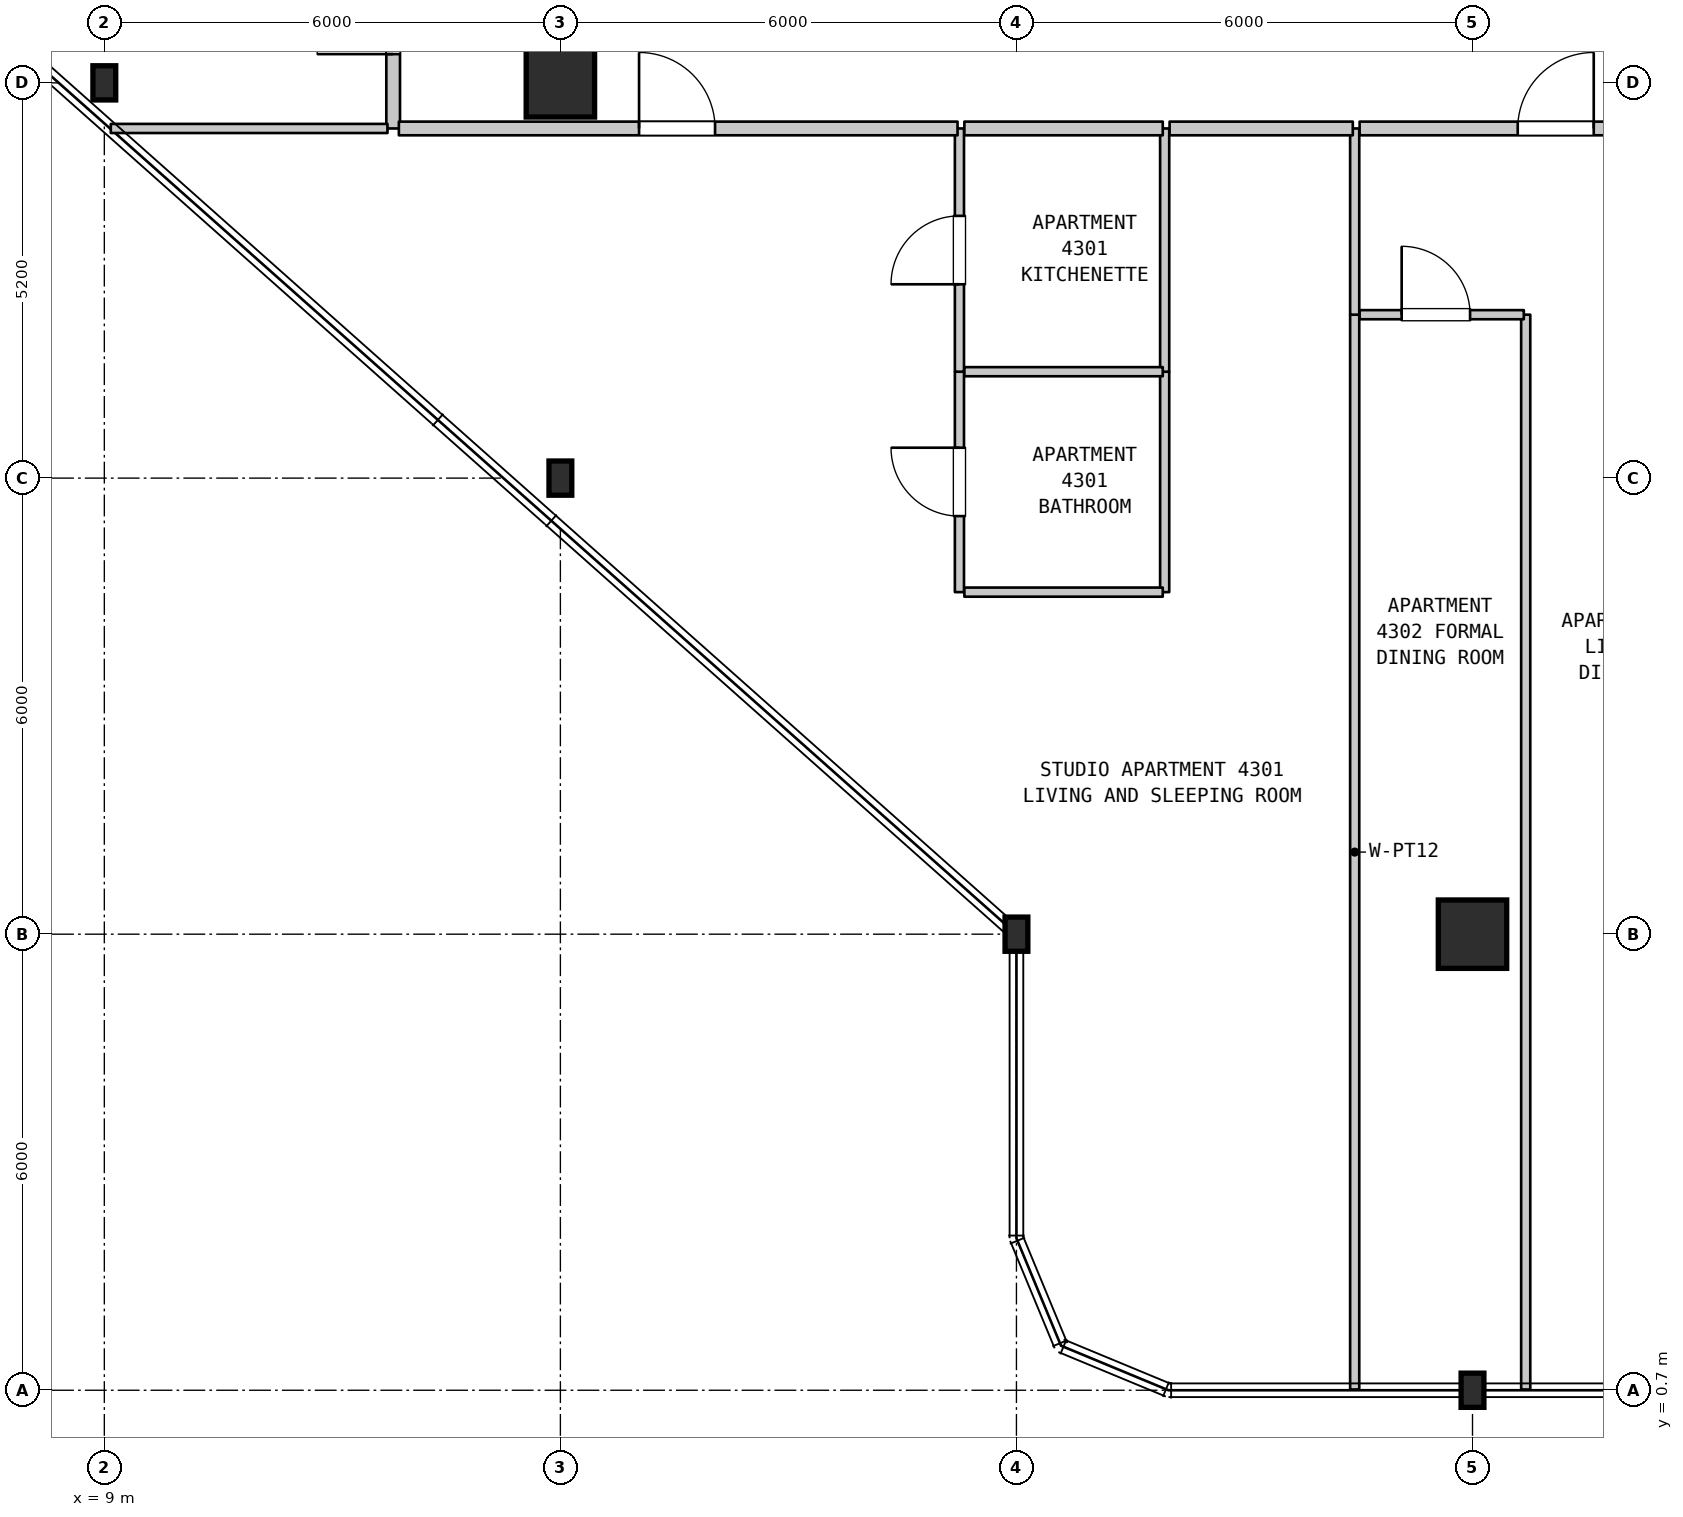
"""IFC4 building model, lengths in metres.
Left out: names, types, materials, properties, quantities, classifications, styles, units other than length and angle.
Written with IfcOpenShell. Run it as: python <this file> out.ifc"""

import sys

from ifc_helpers import new_model, si_unit, direction, frame, frame_2d, origin, origin_2d, place, context, subcontext, project, spatial, rectangle, i_section, extrude, element, fill, save


model = new_model("IFC4")
c1 = context("Model", 3, precision=1e-05, world=origin(), true_north=direction((0.0, 1.0)))
c2 = subcontext(c1, "Body", "Model", "MODEL_VIEW")
j1 = project(units=[si_unit("LENGTHUNIT", "METRE"), si_unit("PLANEANGLEUNIT", "RADIAN")], contexts=[c1])
p1 = place(None, origin())
s1 = spatial("IfcSite", under=j1, at=p1, CompositionType="ELEMENT")
p2 = place(p1, origin())
s2 = spatial("IfcBuilding", under=s1, at=p2, CompositionType="ELEMENT")
p3 = place(p2, frame((0.0, 0.0, 176.5)))
s3 = spatial("IfcBuildingStorey", under=s2, at=p3, CompositionType="ELEMENT", Elevation=176.5)
for number, where, z_axis, x_axis in (
    (1, (9.0, 17.9, 0.0), (0.0, 0.0, 1.0), (1.0, 0.0, 0.0)),
    (2, (15.0, 12.7, 0.0), (0.0, 0.0, 1.0), (1.0, 0.0, 0.0)),
):
    element("IfcColumn", number, at=place(p3, frame(where, z_axis=z_axis, x_axis=x_axis)), inside=s3, PredefinedType="COLUMN", context=c2, shape_type="SweptSolid", body=[
        extrude(i_section(OverallWidth=0.3, OverallDepth=0.45, WebThickness=0.014, FlangeThickness=0.026, FilletRadius=0.027, at=origin_2d()), origin(), (0.0, 0.0, 1.0), 3.7),
    ])
p4 = place(p3, frame((15.0, 17.9, 0.0), z_axis=(0.0, 0.0, 1.0), x_axis=(1.0, 0.0, 0.0)))
e3 = element("IfcColumn", 3, at=p4, inside=s3, PredefinedType="COLUMN", context=c2, shape_type="SweptSolid", body=[
    extrude(rectangle(XDim=0.9, YDim=0.9, at=origin_2d()), origin(), (0.0, 0.0, 1.0), 3.7),
])
for number, where, z_axis, x_axis in (
    (4, (21.0, 6.7, 0.0), (0.0, 0.0, 1.0), (1.0, 0.0, 0.0)),
    (5, (27.0, 0.7, 0.0), (0.0, 0.0, 1.0), (1.0, 0.0, 0.0)),
):
    element("IfcColumn", number, at=place(p3, frame(where, z_axis=z_axis, x_axis=x_axis)), inside=s3, PredefinedType="COLUMN", context=c2, shape_type="SweptSolid", body=[
        extrude(i_section(OverallWidth=0.3, OverallDepth=0.45, WebThickness=0.014, FlangeThickness=0.026, FilletRadius=0.027, at=origin_2d()), origin(), (0.0, 0.0, 1.0), 3.7),
    ])
p5 = place(p3, frame((27.0, 6.7, 0.0), z_axis=(0.0, 0.0, 1.0), x_axis=(1.0, 0.0, 0.0)))
e6 = element("IfcColumn", 6, at=p5, inside=s3, PredefinedType="COLUMN", context=c2, shape_type="SweptSolid", body=[
    extrude(rectangle(XDim=0.9, YDim=0.9, at=origin_2d()), origin(), (0.0, 0.0, 1.0), 3.7),
])
p6 = place(p3, frame((12.8, 17.3, 0.0), z_axis=(0.0, 0.0, 1.0), x_axis=(0.0, 1.0, 0.0)))
e7 = element("IfcWall", 7, at=p6, inside=s3, PredefinedType="STANDARD", context=c2, shape_type="SweptSolid", body=[
    extrude(rectangle(XDim=3.1, YDim=0.18, at=frame_2d((1.55, 0.0))), origin(), (0.0, 0.0, 1.0), 3.39),
])
p7 = place(p6, frame((0.978, 0.0, 0.0)))
e8 = element("IfcOpeningElement", 8, at=p7, cuts=e7, PredefinedType="OPENING", context=c2, shape_type="SweptSolid", body=[
    extrude(rectangle(XDim=1.0, YDim=2.15, at=frame_2d((0.5, 1.075))), frame((0.0, 0.1, 0.0), z_axis=(0.0, -1.0, 0.0), x_axis=(1.0, 0.0, 0.0)), (0.0, 0.0, 1.0), 0.2),
])
p8 = place(p3, frame((20.25, 11.2, 0.0), z_axis=(0.0, 0.0, 1.0), x_axis=(0.0, 1.0, 0.0)))
e9 = element("IfcWall", 9, at=p8, inside=s3, PredefinedType="PARTITIONING", context=c2, shape_type="SweptSolid", body=[
    extrude(rectangle(XDim=2.9, YDim=0.12, at=frame_2d((1.45, 0.0))), origin(), (0.0, 0.0, 1.0), 3.39),
])
p9 = place(p8, frame((1.0, 0.0, 0.0)))
e10 = element("IfcOpeningElement", 10, at=p9, cuts=e9, PredefinedType="OPENING", context=c2, shape_type="SweptSolid", body=[
    extrude(rectangle(XDim=0.9, YDim=2.1, at=frame_2d((0.45, 1.05))), frame((0.0, 0.07, 0.0), z_axis=(0.0, -1.0, 0.0), x_axis=(1.0, 0.0, 0.0)), (0.0, 0.0, 1.0), 0.14),
])
p10 = place(p3, frame((20.25, 14.1, 0.0), z_axis=(0.0, 0.0, 1.0), x_axis=(0.0, 1.0, 0.0)))
e11 = element("IfcWall", 11, at=p10, inside=s3, PredefinedType="PARTITIONING", context=c2, shape_type="SweptSolid", body=[
    extrude(rectangle(XDim=3.2, YDim=0.12, at=frame_2d((1.6, 0.0))), origin(), (0.0, 0.0, 1.0), 3.39),
])
p11 = place(p10, frame((1.15, 0.0, 0.0)))
e12 = element("IfcOpeningElement", 12, at=p11, cuts=e11, PredefinedType="OPENING", context=c2, shape_type="SweptSolid", body=[
    extrude(rectangle(XDim=0.9, YDim=2.15, at=frame_2d((0.45, 1.075))), frame((0.0, 0.07, 0.0), z_axis=(0.0, -1.0, 0.0), x_axis=(1.0, 0.0, 0.0)), (0.0, 0.0, 1.0), 0.14),
])
p12 = place(p3, frame((22.95, 11.2, 0.0), z_axis=(0.0, 0.0, 1.0), x_axis=(0.0, 1.0, 0.0)))
e13 = element("IfcWall", 13, at=p12, inside=s3, PredefinedType="PARTITIONING", context=c2, shape_type="SweptSolid", body=[
    extrude(rectangle(XDim=2.9, YDim=0.12, at=frame_2d((1.45, 0.0))), origin(), (0.0, 0.0, 1.0), 3.39),
])
p13 = place(p3, frame((22.95, 14.1, 0.0), z_axis=(0.0, 0.0, 1.0), x_axis=(0.0, 1.0, 0.0)))
e14 = element("IfcWall", 14, at=p13, inside=s3, PredefinedType="PARTITIONING", context=c2, shape_type="SweptSolid", body=[
    extrude(rectangle(XDim=3.2, YDim=0.12, at=frame_2d((1.6, 0.0))), origin(), (0.0, 0.0, 1.0), 3.39),
])
p14 = place(p3, frame((25.45, 0.71, 0.0), z_axis=(0.0, 0.0, 1.0), x_axis=(0.0, 1.0, 0.0)))
e15 = element("IfcWall", 15, at=p14, inside=s3, PredefinedType="PARTITIONING", context=c2, shape_type="SweptSolid", body=[
    extrude(rectangle(XDim=14.14, YDim=0.12, at=frame_2d((7.07, 0.0))), origin(), (0.0, 0.0, 1.0), 3.39),
])
p15 = place(p3, frame((25.45, 14.85, 0.0), z_axis=(0.0, 0.0, 1.0), x_axis=(0.0, 1.0, 0.0)))
e16 = element("IfcWall", 16, at=p15, inside=s3, PredefinedType="PARTITIONING", context=c2, shape_type="SweptSolid", body=[
    extrude(rectangle(XDim=2.45, YDim=0.12, at=frame_2d((1.225, 0.0))), origin(), (0.0, 0.0, 1.0), 3.39),
])
p16 = place(p3, frame((27.7, 0.71, 0.0), z_axis=(0.0, 0.0, 1.0), x_axis=(0.0, 1.0, 0.0)))
e17 = element("IfcWall", 17, at=p16, inside=s3, PredefinedType="PARTITIONING", context=c2, shape_type="SweptSolid", body=[
    extrude(rectangle(XDim=14.14, YDim=0.12, at=frame_2d((7.07, 0.0))), origin(), (0.0, 0.0, 1.0), 3.39),
])
for number, where, z_axis, x_axis in (
    (18, (20.315, 11.2, 0.0), (0.0, 0.0, 1.0), (1.0, 0.0, 0.0)),
    (19, (20.315, 14.1, 0.0), (0.0, 0.0, 1.0), (1.0, 0.0, 0.0)),
):
    element("IfcWall", number, at=place(p3, frame(where, z_axis=z_axis, x_axis=x_axis)), inside=s3, PredefinedType="PARTITIONING", context=c2, shape_type="SweptSolid", body=[
        extrude(rectangle(XDim=2.61, YDim=0.12, at=frame_2d((1.305, 0.0))), origin(), (0.0, 0.0, 1.0), 3.39),
    ])
p17 = place(p3, frame((25.515, 14.85, 0.0), z_axis=(0.0, 0.0, 1.0), x_axis=(1.0, 0.0, 0.0)))
e20 = element("IfcWall", 20, at=p17, inside=s3, PredefinedType="PARTITIONING", context=c2, shape_type="SweptSolid", body=[
    extrude(rectangle(XDim=2.16, YDim=0.12, at=frame_2d((1.08, 0.0))), origin(), (0.0, 0.0, 1.0), 3.39),
])
p18 = place(p17, frame((0.553, 0.0, 0.0)))
e21 = element("IfcOpeningElement", 21, at=p18, cuts=e20, PredefinedType="OPENING", context=c2, shape_type="SweptSolid", body=[
    extrude(rectangle(XDim=0.9, YDim=2.15, at=frame_2d((0.45, 1.075))), frame((0.0, 0.07, 0.0), z_axis=(0.0, -1.0, 0.0), x_axis=(1.0, 0.0, 0.0)), (0.0, 0.0, 1.0), 0.14),
])
p19 = place(p3, frame((9.085, 17.3, 0.0), z_axis=(0.0, 0.0, 1.0), x_axis=(1.0, 0.0, 0.0)))
e22 = element("IfcWall", 22, at=p19, inside=s3, PredefinedType="PARTITIONING", context=c2, shape_type="SweptSolid", body=[
    extrude(rectangle(XDim=3.64, YDim=0.12, at=frame_2d((1.82, 0.0))), origin(), (0.0, 0.0, 1.0), 3.39),
])
p20 = place(p3, frame((12.875, 17.3, 0.0), z_axis=(0.0, 0.0, 1.0), x_axis=(1.0, 0.0, 0.0)))
e23 = element("IfcWall", 23, at=p20, inside=s3, PredefinedType="STANDARD", context=c2, shape_type="SweptSolid", body=[
    extrude(rectangle(XDim=7.35, YDim=0.18, at=frame_2d((3.675, 0.0))), origin(), (0.0, 0.0, 1.0), 3.39),
])
p21 = place(p20, frame((3.16, 0.0, 0.0)))
e24 = element("IfcOpeningElement", 24, at=p21, cuts=e23, PredefinedType="OPENING", context=c2, shape_type="SweptSolid", body=[
    extrude(rectangle(XDim=1.0, YDim=2.15, at=frame_2d((0.5, 1.075))), frame((0.0, 0.1, 0.0), z_axis=(0.0, -1.0, 0.0), x_axis=(1.0, 0.0, 0.0)), (0.0, 0.0, 1.0), 0.2),
])
p22 = place(p3, frame((20.315, 17.3, 0.0), z_axis=(0.0, 0.0, 1.0), x_axis=(1.0, 0.0, 0.0)))
e25 = element("IfcWall", 25, at=p22, inside=s3, PredefinedType="STANDARD", context=c2, shape_type="SweptSolid", body=[
    extrude(rectangle(XDim=2.61, YDim=0.18, at=frame_2d((1.305, 0.0))), origin(), (0.0, 0.0, 1.0), 3.39),
])
p23 = place(p3, frame((23.015, 17.3, 0.0), z_axis=(0.0, 0.0, 1.0), x_axis=(1.0, 0.0, 0.0)))
e26 = element("IfcWall", 26, at=p23, inside=s3, PredefinedType="STANDARD", context=c2, shape_type="SweptSolid", body=[
    extrude(rectangle(XDim=2.41, YDim=0.18, at=frame_2d((1.205, 0.0))), origin(), (0.0, 0.0, 1.0), 3.39),
])
p24 = place(p3, frame((25.515, 17.3, 0.0), z_axis=(0.0, 0.0, 1.0), x_axis=(1.0, 0.0, 0.0)))
e27 = element("IfcWall", 27, at=p24, inside=s3, PredefinedType="STANDARD", context=c2, shape_type="SweptSolid", body=[
    extrude(rectangle(XDim=5.095, YDim=0.18, at=frame_2d((2.548, 0.0))), origin(), (0.0, 0.0, 1.0), 3.39),
])
p25 = place(p24, frame((2.08, 0.0, 0.0)))
e28 = element("IfcOpeningElement", 28, at=p25, cuts=e27, PredefinedType="OPENING", context=c2, shape_type="SweptSolid", body=[
    extrude(rectangle(XDim=1.0, YDim=2.15, at=frame_2d((0.5, 1.075))), frame((0.0, 0.1, 0.0), z_axis=(0.0, -1.0, 0.0), x_axis=(1.0, 0.0, 0.0)), (0.0, 0.0, 1.0), 0.2),
])
p26 = place(p7, origin())
e29 = element("IfcDoor", 29, at=p26, inside=s3, OperationType="SINGLE_SWING_LEFT", PredefinedType="DOOR", context=c2, shape_type="SweptSolid", body=[
    extrude(rectangle(XDim=1.0, YDim=2.15, at=frame_2d((0.5, 1.075))), frame((0.0, 0.025, 0.0), z_axis=(0.0, -1.0, 0.0), x_axis=(1.0, 0.0, 0.0)), (0.0, 0.0, 1.0), 0.05),
])
fill(e8, e29)
p27 = place(p9, origin())
e30 = element("IfcDoor", 30, at=p27, inside=s3, OperationType="SINGLE_SWING_RIGHT", PredefinedType="DOOR", context=c2, shape_type="SweptSolid", body=[
    extrude(rectangle(XDim=0.9, YDim=2.1, at=frame_2d((0.45, 1.05))), frame((0.0, 0.025, 0.0), z_axis=(0.0, -1.0, 0.0), x_axis=(1.0, 0.0, 0.0)), (0.0, 0.0, 1.0), 0.05),
])
fill(e10, e30)
p28 = place(p11, origin())
e31 = element("IfcDoor", 31, at=p28, inside=s3, OperationType="SINGLE_SWING_LEFT", PredefinedType="DOOR", context=c2, shape_type="SweptSolid", body=[
    extrude(rectangle(XDim=0.9, YDim=2.15, at=frame_2d((0.45, 1.075))), frame((0.0, 0.025, 0.0), z_axis=(0.0, -1.0, 0.0), x_axis=(1.0, 0.0, 0.0)), (0.0, 0.0, 1.0), 0.05),
])
fill(e12, e31)
p29 = place(p18, origin())
e32 = element("IfcDoor", 32, at=p29, inside=s3, OperationType="SINGLE_SWING_LEFT", PredefinedType="DOOR", context=c2, shape_type="SweptSolid", body=[
    extrude(rectangle(XDim=0.9, YDim=2.15, at=frame_2d((0.45, 1.075))), frame((0.0, 0.025, 0.0), z_axis=(0.0, -1.0, 0.0), x_axis=(1.0, 0.0, 0.0)), (0.0, 0.0, 1.0), 0.05),
])
fill(e21, e32)
p30 = place(p21, origin())
e33 = element("IfcDoor", 33, at=p30, inside=s3, OperationType="SINGLE_SWING_LEFT", PredefinedType="DOOR", context=c2, shape_type="SweptSolid", body=[
    extrude(rectangle(XDim=1.0, YDim=2.15, at=frame_2d((0.5, 1.075))), frame((0.0, 0.025, 0.0), z_axis=(0.0, -1.0, 0.0), x_axis=(1.0, 0.0, 0.0)), (0.0, 0.0, 1.0), 0.05),
])
fill(e24, e33)
p31 = place(p25, origin())
e34 = element("IfcDoor", 34, at=p31, inside=s3, OperationType="SINGLE_SWING_RIGHT", PredefinedType="DOOR", context=c2, shape_type="SweptSolid", body=[
    extrude(rectangle(XDim=1.0, YDim=2.15, at=frame_2d((0.5, 1.075))), frame((0.0, 0.025, 0.0), z_axis=(0.0, -1.0, 0.0), x_axis=(1.0, 0.0, 0.0)), (0.0, 0.0, 1.0), 0.05),
])
fill(e28, e34)
save(model, sys.argv[1])
